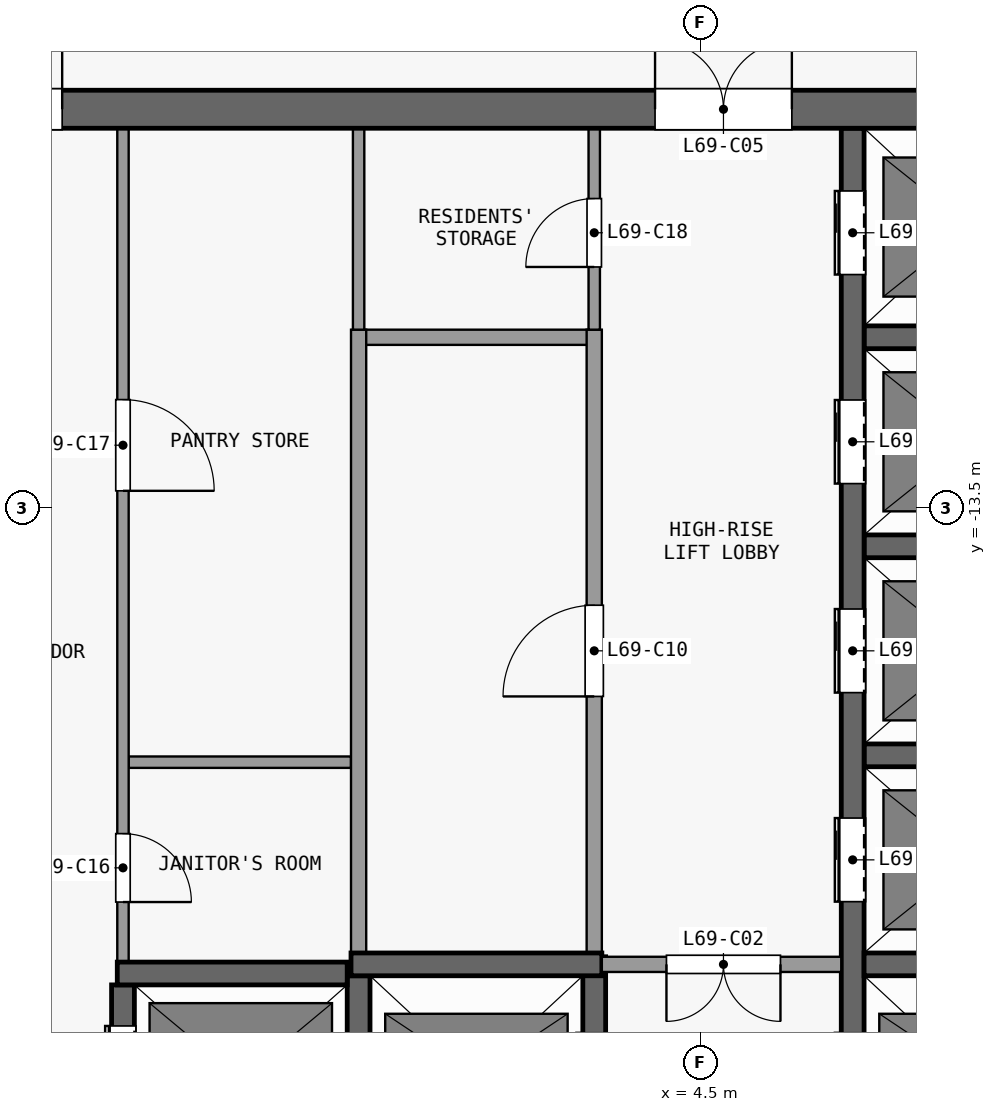
"""IFC4 building model, lengths in metres.
Left out: names, types, materials, properties, quantities, classifications, styles, units other than length and angle.
Written with IfcOpenShell. Run it as: python <this file> out.ifc"""

import sys

from ifc_helpers import new_model, si_unit, direction, frame, frame_2d, origin, place, context, subcontext, project, spatial, rectangle, extrude, element, fill, save


model = new_model("IFC4")
c1 = context("Model", 3, precision=1e-05, world=origin(), true_north=direction((0.0, 1.0)))
c2 = subcontext(c1, "Body", "Model", "MODEL_VIEW")
j1 = project(units=[si_unit("LENGTHUNIT", "METRE"), si_unit("PLANEANGLEUNIT", "RADIAN")], contexts=[c1])
p1 = place(None, origin())
s1 = spatial("IfcSite", under=j1, at=p1, CompositionType="ELEMENT")
p2 = place(p1, origin())
s2 = spatial("IfcBuilding", under=s1, at=p2, CompositionType="ELEMENT")
p3 = place(p2, frame((0.0, 0.0, 273.5)))
s3 = spatial("IfcBuildingStorey", under=s2, at=p3, CompositionType="ELEMENT", Elevation=273.5)
p4 = place(p3, frame((-13.1, -8.25, 0.0), z_axis=(0.0, 0.0, 1.0), x_axis=(1.0, 0.0, 0.0)))
e1 = element("IfcWall", 1, at=p4, inside=s3, PredefinedType="SHEAR", context=c2, shape_type="SweptSolid", body=[
    extrude(rectangle(XDim=26.2, YDim=0.5, at=frame_2d((13.1, 0.0))), origin(), (0.0, 0.0, 1.0), 3.3),
])
p5 = place(p4, frame((7.4, 0.0, 0.0)))
e2 = element("IfcOpeningElement", 2, at=p5, cuts=e1, PredefinedType="OPENING", context=c2, shape_type="SweptSolid", body=[
    extrude(rectangle(XDim=1.8, YDim=2.1, at=frame_2d((0.9, 1.05))), frame((0.0, 0.26, 0.0), z_axis=(0.0, -1.0, 0.0), x_axis=(1.0, 0.0, 0.0)), (0.0, 0.0, 1.0), 0.52),
])
p6 = place(p4, frame((17.0, 0.0, 0.0)))
e3 = element("IfcOpeningElement", 3, at=p6, cuts=e1, PredefinedType="OPENING", context=c2, shape_type="SweptSolid", body=[
    extrude(rectangle(XDim=1.8, YDim=2.1, at=frame_2d((0.9, 1.05))), frame((0.0, 0.26, 0.0), z_axis=(0.0, -1.0, 0.0), x_axis=(1.0, 0.0, 0.0)), (0.0, 0.0, 1.0), 0.52),
])
p7 = place(p4, frame((2.325, 0.0, 0.0)))
e4 = element("IfcOpeningElement", 4, at=p7, cuts=e1, PredefinedType="OPENING", context=c2, shape_type="SweptSolid", body=[
    extrude(rectangle(XDim=0.9, YDim=2.1, at=frame_2d((0.45, 1.05))), frame((0.0, 0.26, 0.0), z_axis=(0.0, -1.0, 0.0), x_axis=(1.0, 0.0, 0.0)), (0.0, 0.0, 1.0), 0.52),
])
p8 = place(p4, frame((22.975, 0.0, 0.0)))
e5 = element("IfcOpeningElement", 5, at=p8, cuts=e1, PredefinedType="OPENING", context=c2, shape_type="SweptSolid", body=[
    extrude(rectangle(XDim=0.9, YDim=2.1, at=frame_2d((0.45, 1.05))), frame((0.0, 0.26, 0.0), z_axis=(0.0, -1.0, 0.0), x_axis=(1.0, 0.0, 0.0)), (0.0, 0.0, 1.0), 0.52),
])
p9 = place(p3, frame((-3.175, -19.62, 0.0), z_axis=(0.0, 0.0, 1.0), x_axis=(1.0, 0.0, 0.0)))
e6 = element("IfcWall", 6, at=p9, inside=s3, PredefinedType="SHEAR", context=c2, shape_type="SweptSolid", body=[
    extrude(rectangle(XDim=3.025, YDim=0.3, at=frame_2d((1.513, 0.0))), origin(), (0.0, 0.0, 1.0), 3.3),
])
p10 = place(p3, frame((-0.1, -19.5, 0.0), z_axis=(0.0, 0.0, 1.0), x_axis=(1.0, 0.0, 0.0)))
e7 = element("IfcWall", 7, at=p10, inside=s3, PredefinedType="SHEAR", context=c2, shape_type="SweptSolid", body=[
    extrude(rectangle(XDim=3.3, YDim=0.3, at=frame_2d((1.65, 0.0))), origin(), (0.0, 0.0, 1.0), 3.3),
])
p11 = place(p3, frame((6.35, -19.5, 0.0), z_axis=(0.0, 0.0, 1.0), x_axis=(-1.0, 0.0, 0.0)))
e8 = element("IfcWall", 8, at=p11, inside=s3, PredefinedType="PARTITIONING", context=c2, shape_type="SweptSolid", body=[
    extrude(rectangle(XDim=3.15, YDim=0.2, at=frame_2d((1.575, 0.0))), origin(), (0.0, 0.0, 1.0), 3.3),
])
p12 = place(p11, frame((0.8, 0.0, 0.0)))
e9 = element("IfcOpeningElement", 9, at=p12, cuts=e8, PredefinedType="OPENING", context=c2, shape_type="SweptSolid", body=[
    extrude(rectangle(XDim=1.5, YDim=2.1, at=frame_2d((0.75, 1.05))), frame((0.0, 0.11, 0.0), z_axis=(0.0, -1.0, 0.0), x_axis=(1.0, 0.0, 0.0)), (0.0, 0.0, 1.0), 0.22),
])
p13 = place(p3, frame((6.65, -19.5, 0.0), z_axis=(0.0, 0.0, 1.0), x_axis=(1.0, 0.0, 0.0)))
e10 = element("IfcWall", 10, at=p13, inside=s3, PredefinedType="SHEAR", context=c2, shape_type="SweptSolid", body=[
    extrude(rectangle(XDim=2.8, YDim=0.3, at=frame_2d((1.4, 0.0))), origin(), (0.0, 0.0, 1.0), 3.3),
])
p14 = place(p3, frame((-3.025, -16.84, 0.0), z_axis=(0.0, 0.0, 1.0), x_axis=(1.0, 0.0, 0.0)))
e11 = element("IfcWall", 11, at=p14, inside=s3, PredefinedType="PARTITIONING", context=c2, shape_type="SweptSolid", body=[
    extrude(rectangle(XDim=2.925, YDim=0.15, at=frame_2d((1.462, 0.0))), origin(), (0.0, 0.0, 1.0), 3.3),
])
for number, where, z_axis, x_axis in (
    (12, (6.65, -16.75, 0.0), (0.0, 0.0, 1.0), (1.0, 0.0, 0.0)),
    (13, (6.65, -14.0, 0.0), (0.0, 0.0, 1.0), (1.0, 0.0, 0.0)),
):
    element("IfcWall", number, at=place(p3, frame(where, z_axis=z_axis, x_axis=x_axis)), inside=s3, PredefinedType="SHEAR", context=c2, shape_type="SweptSolid", body=[
        extrude(rectangle(XDim=2.8, YDim=0.3, at=frame_2d((1.4, 0.0))), origin(), (0.0, 0.0, 1.0), 3.3),
    ])
p15 = place(p3, frame((-0.075, -11.25, 0.0), z_axis=(0.0, 0.0, 1.0), x_axis=(1.0, 0.0, 0.0)))
e14 = element("IfcWall", 14, at=p15, inside=s3, PredefinedType="PARTITIONING", context=c2, shape_type="SweptSolid", body=[
    extrude(rectangle(XDim=3.25, YDim=0.2, at=frame_2d((1.625, 0.0))), origin(), (0.0, 0.0, 1.0), 3.3),
])
p16 = place(p3, frame((6.65, -11.25, 0.0), z_axis=(0.0, 0.0, 1.0), x_axis=(1.0, 0.0, 0.0)))
e15 = element("IfcWall", 15, at=p16, inside=s3, PredefinedType="SHEAR", context=c2, shape_type="SweptSolid", body=[
    extrude(rectangle(XDim=2.8, YDim=0.3, at=frame_2d((1.4, 0.0))), origin(), (0.0, 0.0, 1.0), 3.3),
])
p17 = place(p3, frame((-3.1, -22.25, 0.0), z_axis=(0.0, 0.0, 1.0), x_axis=(0.0, 1.0, 0.0)))
e16 = element("IfcWall", 16, at=p17, inside=s3, PredefinedType="SHEAR", context=c2, shape_type="SweptSolid", body=[
    extrude(rectangle(XDim=2.48, YDim=0.3, at=frame_2d((1.24, 0.0))), origin(), (0.0, 0.0, 1.0), 3.3),
])
p18 = place(p17, frame((0.54, 0.0, 0.0)))
e17 = element("IfcOpeningElement", 17, at=p18, cuts=e16, PredefinedType="OPENING", context=c2, shape_type="SweptSolid", body=[
    extrude(rectangle(XDim=1.4, YDim=2.1, at=frame_2d((0.7, 1.05))), frame((0.0, 0.16, 0.0), z_axis=(0.0, -1.0, 0.0), x_axis=(1.0, 0.0, 0.0)), (0.0, 0.0, 1.0), 0.32),
])
p19 = place(p3, frame((-3.1, -8.5, 0.0), z_axis=(0.0, 0.0, 1.0), x_axis=(0.0, -1.0, 0.0)))
e18 = element("IfcWall", 18, at=p19, inside=s3, PredefinedType="PARTITIONING", context=c2, shape_type="SweptSolid", body=[
    extrude(rectangle(XDim=10.97, YDim=0.15, at=frame_2d((5.485, 0.0))), origin(), (0.0, 0.0, 1.0), 3.3),
])
p20 = place(p19, frame((9.28, 0.0, 0.0)))
e19 = element("IfcOpeningElement", 19, at=p20, cuts=e18, PredefinedType="OPENING", context=c2, shape_type="SweptSolid", body=[
    extrude(rectangle(XDim=0.9, YDim=2.1, at=frame_2d((0.45, 1.05))), frame((0.0, 0.085, 0.0), z_axis=(0.0, -1.0, 0.0), x_axis=(1.0, 0.0, 0.0)), (0.0, 0.0, 1.0), 0.17),
])
p21 = place(p19, frame((3.57, 0.0, 0.0)))
e20 = element("IfcOpeningElement", 20, at=p21, cuts=e18, PredefinedType="OPENING", context=c2, shape_type="SweptSolid", body=[
    extrude(rectangle(XDim=1.2, YDim=2.1, at=frame_2d((0.6, 1.05))), frame((0.0, 0.085, 0.0), z_axis=(0.0, -1.0, 0.0), x_axis=(1.0, 0.0, 0.0)), (0.0, 0.0, 1.0), 0.17),
])
p22 = place(p3, frame((0.0, -22.25, 0.0), z_axis=(0.0, 0.0, 1.0), x_axis=(0.0, 1.0, 0.0)))
e21 = element("IfcWall", 21, at=p22, inside=s3, PredefinedType="SHEAR", context=c2, shape_type="SweptSolid", body=[
    extrude(rectangle(XDim=2.6, YDim=0.3, at=frame_2d((1.3, 0.0))), origin(), (0.0, 0.0, 1.0), 3.3),
])
p23 = place(p3, frame((0.0, -19.35, 0.0), z_axis=(0.0, 0.0, 1.0), x_axis=(0.0, 1.0, 0.0)))
e22 = element("IfcWall", 22, at=p23, inside=s3, PredefinedType="PARTITIONING", context=c2, shape_type="SweptSolid", body=[
    extrude(rectangle(XDim=8.2, YDim=0.2, at=frame_2d((4.1, 0.0))), origin(), (0.0, 0.0, 1.0), 3.3),
])
p24 = place(p3, frame((0.0, -11.15, 0.0), z_axis=(0.0, 0.0, 1.0), x_axis=(0.0, 1.0, 0.0)))
e23 = element("IfcWall", 23, at=p24, inside=s3, PredefinedType="PARTITIONING", context=c2, shape_type="SweptSolid", body=[
    extrude(rectangle(XDim=2.65, YDim=0.15, at=frame_2d((1.325, 0.0))), origin(), (0.0, 0.0, 1.0), 3.3),
])
p25 = place(p3, frame((3.1, -22.25, 0.0), z_axis=(0.0, 0.0, 1.0), x_axis=(0.0, 1.0, 0.0)))
e24 = element("IfcWall", 24, at=p25, inside=s3, PredefinedType="SHEAR", context=c2, shape_type="SweptSolid", body=[
    extrude(rectangle(XDim=2.85, YDim=0.3, at=frame_2d((1.425, 0.0))), origin(), (0.0, 0.0, 1.0), 3.3),
])
p26 = place(p25, frame((0.75, 0.0, 0.0)))
e25 = element("IfcOpeningElement", 25, at=p26, cuts=e24, PredefinedType="OPENING", context=c2, shape_type="SweptSolid", body=[
    extrude(rectangle(XDim=1.1, YDim=2.1, at=frame_2d((0.55, 1.05))), frame((0.0, 0.16, 0.0), z_axis=(0.0, -1.0, 0.0), x_axis=(1.0, 0.0, 0.0)), (0.0, 0.0, 1.0), 0.32),
])
p27 = place(p3, frame((3.1, -19.6, 0.0), z_axis=(0.0, 0.0, 1.0), x_axis=(0.0, 1.0, 0.0)))
e26 = element("IfcWall", 26, at=p27, inside=s3, PredefinedType="PARTITIONING", context=c2, shape_type="SweptSolid", body=[
    extrude(rectangle(XDim=8.45, YDim=0.2, at=frame_2d((4.225, 0.0))), origin(), (0.0, 0.0, 1.0), 3.3),
])
p28 = place(p27, frame((3.625, 0.0, 0.0)))
e27 = element("IfcOpeningElement", 27, at=p28, cuts=e26, PredefinedType="OPENING", context=c2, shape_type="SweptSolid", body=[
    extrude(rectangle(XDim=1.2, YDim=2.1, at=frame_2d((0.6, 1.05))), frame((0.0, 0.11, 0.0), z_axis=(0.0, -1.0, 0.0), x_axis=(1.0, 0.0, 0.0)), (0.0, 0.0, 1.0), 0.22),
])
p29 = place(p3, frame((3.1, -11.15, 0.0), z_axis=(0.0, 0.0, 1.0), x_axis=(0.0, 1.0, 0.0)))
e28 = element("IfcWall", 28, at=p29, inside=s3, PredefinedType="PARTITIONING", context=c2, shape_type="SweptSolid", body=[
    extrude(rectangle(XDim=2.65, YDim=0.15, at=frame_2d((1.325, 0.0))), origin(), (0.0, 0.0, 1.0), 3.3),
])
p30 = place(p29, frame((0.825, 0.0, 0.0)))
e29 = element("IfcOpeningElement", 29, at=p30, cuts=e28, PredefinedType="OPENING", context=c2, shape_type="SweptSolid", body=[
    extrude(rectangle(XDim=0.9, YDim=2.1, at=frame_2d((0.45, 1.05))), frame((0.0, 0.085, 0.0), z_axis=(0.0, -1.0, 0.0), x_axis=(1.0, 0.0, 0.0)), (0.0, 0.0, 1.0), 0.17),
])
p31 = place(p3, frame((6.5, -22.55, 0.0), z_axis=(0.0, 0.0, 1.0), x_axis=(0.0, 1.0, 0.0)))
e30 = element("IfcWall", 30, at=p31, inside=s3, PredefinedType="SHEAR", context=c2, shape_type="SweptSolid", body=[
    extrude(rectangle(XDim=14.05, YDim=0.3, at=frame_2d((7.025, 0.0))), origin(), (0.0, 0.0, 1.0), 3.3),
])
p32 = place(p31, frame((1.05, 0.0, 0.0)))
e31 = element("IfcOpeningElement", 31, at=p32, cuts=e30, PredefinedType="OPENING", context=c2, shape_type="SweptSolid", body=[
    extrude(rectangle(XDim=1.1, YDim=2.1, at=frame_2d((0.55, 1.05))), frame((0.0, 0.16, 0.0), z_axis=(0.0, -1.0, 0.0), x_axis=(1.0, 0.0, 0.0)), (0.0, 0.0, 1.0), 0.32),
])
p33 = place(p31, frame((3.875, 0.0, 0.0)))
e32 = element("IfcOpeningElement", 32, at=p33, cuts=e30, PredefinedType="OPENING", context=c2, shape_type="SweptSolid", body=[
    extrude(rectangle(XDim=1.1, YDim=2.1, at=frame_2d((0.55, 1.05))), frame((0.0, 0.16, 0.0), z_axis=(0.0, -1.0, 0.0), x_axis=(1.0, 0.0, 0.0)), (0.0, 0.0, 1.0), 0.32),
])
p34 = place(p31, frame((6.625, 0.0, 0.0)))
e33 = element("IfcOpeningElement", 33, at=p34, cuts=e30, PredefinedType="OPENING", context=c2, shape_type="SweptSolid", body=[
    extrude(rectangle(XDim=1.1, YDim=2.1, at=frame_2d((0.55, 1.05))), frame((0.0, 0.16, 0.0), z_axis=(0.0, -1.0, 0.0), x_axis=(1.0, 0.0, 0.0)), (0.0, 0.0, 1.0), 0.32),
])
p35 = place(p31, frame((9.375, 0.0, 0.0)))
e34 = element("IfcOpeningElement", 34, at=p35, cuts=e30, PredefinedType="OPENING", context=c2, shape_type="SweptSolid", body=[
    extrude(rectangle(XDim=1.1, YDim=2.1, at=frame_2d((0.55, 1.05))), frame((0.0, 0.16, 0.0), z_axis=(0.0, -1.0, 0.0), x_axis=(1.0, 0.0, 0.0)), (0.0, 0.0, 1.0), 0.32),
])
p36 = place(p31, frame((12.125, 0.0, 0.0)))
e35 = element("IfcOpeningElement", 35, at=p36, cuts=e30, PredefinedType="OPENING", context=c2, shape_type="SweptSolid", body=[
    extrude(rectangle(XDim=1.1, YDim=2.1, at=frame_2d((0.55, 1.05))), frame((0.0, 0.16, 0.0), z_axis=(0.0, -1.0, 0.0), x_axis=(1.0, 0.0, 0.0)), (0.0, 0.0, 1.0), 0.32),
])
p37 = place(p33, origin())
e36 = element("IfcDoor", 36, at=p37, inside=s3, OperationType="DOUBLE_DOOR_SLIDING", PredefinedType="DOOR", context=c2, shape_type="SweptSolid", body=[
    extrude(rectangle(XDim=1.1, YDim=2.1, at=frame_2d((0.55, 1.05))), frame((0.0, 0.025, 0.0), z_axis=(0.0, -1.0, 0.0), x_axis=(1.0, 0.0, 0.0)), (0.0, 0.0, 1.0), 0.05),
])
fill(e32, e36)
p38 = place(p34, origin())
e37 = element("IfcDoor", 37, at=p38, inside=s3, OperationType="DOUBLE_DOOR_SLIDING", PredefinedType="DOOR", context=c2, shape_type="SweptSolid", body=[
    extrude(rectangle(XDim=1.1, YDim=2.1, at=frame_2d((0.55, 1.05))), frame((0.0, 0.025, 0.0), z_axis=(0.0, -1.0, 0.0), x_axis=(1.0, 0.0, 0.0)), (0.0, 0.0, 1.0), 0.05),
])
fill(e33, e37)
p39 = place(p35, origin())
e38 = element("IfcDoor", 38, at=p39, inside=s3, OperationType="DOUBLE_DOOR_SLIDING", PredefinedType="DOOR", context=c2, shape_type="SweptSolid", body=[
    extrude(rectangle(XDim=1.1, YDim=2.1, at=frame_2d((0.55, 1.05))), frame((0.0, 0.025, 0.0), z_axis=(0.0, -1.0, 0.0), x_axis=(1.0, 0.0, 0.0)), (0.0, 0.0, 1.0), 0.05),
])
fill(e34, e38)
p40 = place(p36, origin())
e39 = element("IfcDoor", 39, at=p40, inside=s3, OperationType="DOUBLE_DOOR_SLIDING", PredefinedType="DOOR", context=c2, shape_type="SweptSolid", body=[
    extrude(rectangle(XDim=1.1, YDim=2.1, at=frame_2d((0.55, 1.05))), frame((0.0, 0.025, 0.0), z_axis=(0.0, -1.0, 0.0), x_axis=(1.0, 0.0, 0.0)), (0.0, 0.0, 1.0), 0.05),
])
fill(e35, e39)
p41 = place(p18, origin())
e40 = element("IfcDoor", 40, at=p41, inside=s3, OperationType="DOUBLE_DOOR_SLIDING", PredefinedType="DOOR", context=c2, shape_type="SweptSolid", body=[
    extrude(rectangle(XDim=1.4, YDim=2.1, at=frame_2d((0.7, 1.05))), frame((0.0, 0.025, 0.0), z_axis=(0.0, -1.0, 0.0), x_axis=(1.0, 0.0, 0.0)), (0.0, 0.0, 1.0), 0.05),
])
fill(e17, e40)
p42 = place(p12, origin())
e41 = element("IfcDoor", 41, at=p42, inside=s3, OperationType="DOUBLE_DOOR_SINGLE_SWING", PredefinedType="DOOR", context=c2, shape_type="SweptSolid", body=[
    extrude(rectangle(XDim=1.5, YDim=2.1, at=frame_2d((0.75, 1.05))), frame((0.0, 0.025, 0.0), z_axis=(0.0, -1.0, 0.0), x_axis=(1.0, 0.0, 0.0)), (0.0, 0.0, 1.0), 0.05),
])
fill(e9, e41)
p43 = place(p5, origin())
e42 = element("IfcDoor", 42, at=p43, inside=s3, OperationType="DOUBLE_DOOR_SINGLE_SWING", PredefinedType="DOOR", context=c2, shape_type="SweptSolid", body=[
    extrude(rectangle(XDim=1.8, YDim=2.1, at=frame_2d((0.9, 1.05))), frame((0.0, 0.025, 0.0), z_axis=(0.0, -1.0, 0.0), x_axis=(1.0, 0.0, 0.0)), (0.0, 0.0, 1.0), 0.05),
])
fill(e2, e42)
p44 = place(p6, origin())
e43 = element("IfcDoor", 43, at=p44, inside=s3, OperationType="DOUBLE_DOOR_SINGLE_SWING", PredefinedType="DOOR", context=c2, shape_type="SweptSolid", body=[
    extrude(rectangle(XDim=1.8, YDim=2.1, at=frame_2d((0.9, 1.05))), frame((0.0, 0.025, 0.0), z_axis=(0.0, -1.0, 0.0), x_axis=(1.0, 0.0, 0.0)), (0.0, 0.0, 1.0), 0.05),
])
fill(e3, e43)
p45 = place(p28, origin())
e44 = element("IfcDoor", 44, at=p45, inside=s3, OperationType="SINGLE_SWING_LEFT", PredefinedType="DOOR", context=c2, shape_type="SweptSolid", body=[
    extrude(rectangle(XDim=1.2, YDim=2.1, at=frame_2d((0.6, 1.05))), frame((0.0, 0.025, 0.0), z_axis=(0.0, -1.0, 0.0), x_axis=(1.0, 0.0, 0.0)), (0.0, 0.0, 1.0), 0.05),
])
fill(e27, e44)
p46 = place(p20, origin())
e45 = element("IfcDoor", 45, at=p46, inside=s3, OperationType="SINGLE_SWING_RIGHT", PredefinedType="DOOR", context=c2, shape_type="SweptSolid", body=[
    extrude(rectangle(XDim=0.9, YDim=2.1, at=frame_2d((0.45, 1.05))), frame((0.0, 0.025, 0.0), z_axis=(0.0, -1.0, 0.0), x_axis=(1.0, 0.0, 0.0)), (0.0, 0.0, 1.0), 0.05),
])
fill(e19, e45)
p47 = place(p21, origin())
e46 = element("IfcDoor", 46, at=p47, inside=s3, OperationType="SINGLE_SWING_RIGHT", PredefinedType="DOOR", context=c2, shape_type="SweptSolid", body=[
    extrude(rectangle(XDim=1.2, YDim=2.1, at=frame_2d((0.6, 1.05))), frame((0.0, 0.025, 0.0), z_axis=(0.0, -1.0, 0.0), x_axis=(1.0, 0.0, 0.0)), (0.0, 0.0, 1.0), 0.05),
])
fill(e20, e46)
p48 = place(p30, origin())
e47 = element("IfcDoor", 47, at=p48, inside=s3, OperationType="SINGLE_SWING_LEFT", PredefinedType="DOOR", context=c2, shape_type="SweptSolid", body=[
    extrude(rectangle(XDim=0.9, YDim=2.1, at=frame_2d((0.45, 1.05))), frame((0.0, 0.025, 0.0), z_axis=(0.0, -1.0, 0.0), x_axis=(1.0, 0.0, 0.0)), (0.0, 0.0, 1.0), 0.05),
])
fill(e29, e47)
save(model, sys.argv[1])
